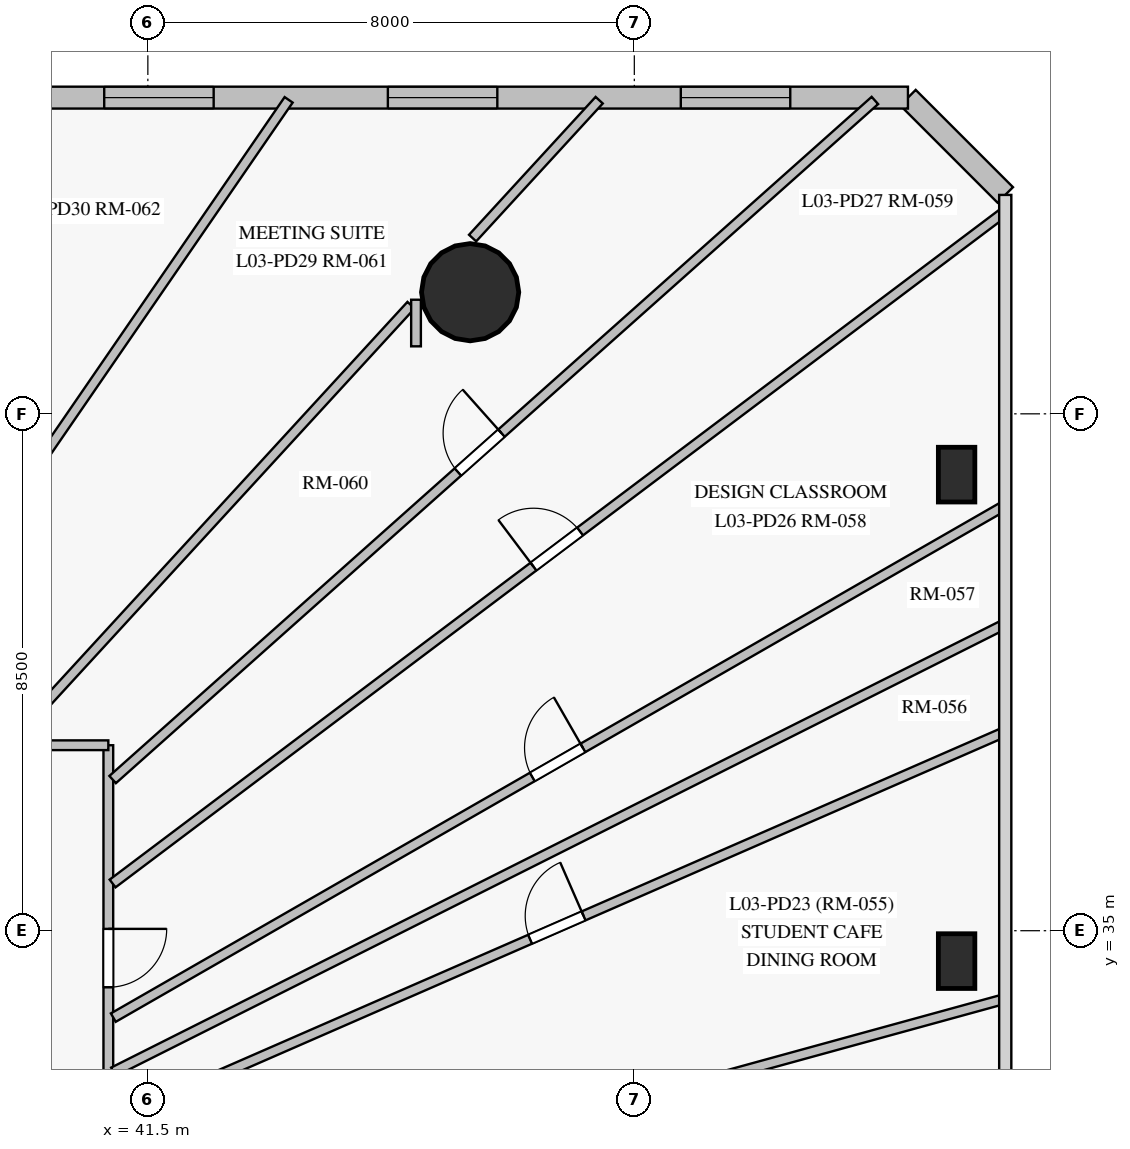
"""IFC4 building model, lengths in metres.
Left out: names, types, materials, properties, quantities, classifications, styles, units other than length and angle.
Written with IfcOpenShell. Run it as: python <this file> out.ifc"""

import sys

from ifc_helpers import new_model, si_unit, direction, frame, frame_2d, origin, origin_with_axes, origin_2d, place, context, subcontext, project, spatial, rectangle, circle, extrude, source, transform, mapped, element, fill, save


model = new_model("IFC4")
c1 = context("Model", 3, precision=1e-05, world=origin(), true_north=direction((0.0, 1.0)))
c2 = subcontext(c1, "Body", "Model", "MODEL_VIEW")
j1 = project(units=[si_unit("LENGTHUNIT", "METRE"), si_unit("PLANEANGLEUNIT", "RADIAN")], contexts=[c1])
p1 = place(None, origin())
s1 = spatial("IfcSite", under=j1, at=p1, CompositionType="ELEMENT")
p2 = place(p1, origin())
s2 = spatial("IfcBuilding", under=s1, at=p2, CompositionType="ELEMENT")
p3 = place(p2, frame((0.0, 0.0, 13.5)))
s3 = spatial("IfcBuildingStorey", under=s2, at=p3, CompositionType="ELEMENT", Elevation=13.5)
m1 = source(origin_with_axes(), c2, "Body", "SweptSolid", [
    extrude(circle(Radius=0.8, at=origin_2d()), origin(), (0.0, 0.0, 1.0), 4.5),
])
p4 = place(p3, frame((46.8, 45.5, 0.0), z_axis=(0.0, 0.0, 1.0), x_axis=(1.0, 0.0, 0.0)))
e1 = element("IfcColumn", 1, at=p4, inside=s3, PredefinedType="COLUMN", context=c2, shape_type="MappedRepresentation", body=[
    mapped(m1, transform((0.0, 0.0, 0.0), scale=1.0)),
])
m2 = source(origin_with_axes(), c2, "Body", "SweptSolid", [
    extrude(rectangle(XDim=0.6, YDim=0.9, at=origin_2d()), origin(), (0.0, 0.0, 1.0), 4.5),
])
for number, where, z_axis, x_axis in (
    (2, (54.8, 34.5, 0.0), (0.0, 0.0, 1.0), (1.0, 0.0, 0.0)),
    (3, (54.8, 42.5, 0.0), (0.0, 0.0, 1.0), (1.0, 0.0, 0.0)),
):
    element("IfcColumn", number, at=place(p3, frame(where, z_axis=z_axis, x_axis=x_axis)), inside=s3, PredefinedType="PILASTER", context=c2, shape_type="MappedRepresentation", body=[
        mapped(m2, transform((0.0, 0.0, 0.0), scale=1.0)),
    ])
p5 = place(p3, frame((55.6, 47.1, 0.0), z_axis=(0.0, 0.0, 1.0), x_axis=(-0.707160727918, 0.707052830339, 0.0)))
e4 = element("IfcWall", 4, at=p5, inside=s3, PredefinedType="SOLIDWALL", context=c2, shape_type="SweptSolid", body=[
    extrude(rectangle(XDim=2.263, YDim=0.36, at=frame_2d((1.131, 0.0))), origin(), (0.0, 0.0, 1.0), 4.225),
])
p6 = place(p3, frame((54.0, 48.7, 0.0), z_axis=(0.0, 0.0, 1.0), x_axis=(-1.0, 0.0, 0.0)))
e5 = element("IfcWall", 5, at=p6, inside=s3, PredefinedType="SOLIDWALL", context=c2, shape_type="SweptSolid", body=[
    extrude(rectangle(XDim=46.8, YDim=0.36, at=frame_2d((23.4, 0.0))), origin(), (0.0, 0.0, 1.0), 4.225),
])
p7 = place(p6, frame((1.936, 0.0, 0.85)))
e6 = element("IfcOpeningElement", 6, at=p7, cuts=e5, PredefinedType="OPENING", context=c2, shape_type="SweptSolid", body=[
    extrude(rectangle(XDim=1.8, YDim=2.2, at=frame_2d((0.9, 1.1))), frame((0.0, 0.19, 0.0), z_axis=(0.0, -1.0, 0.0), x_axis=(1.0, 0.0, 0.0)), (0.0, 0.0, 1.0), 0.38),
])
p8 = place(p6, frame((6.753, 0.0, 0.85)))
e7 = element("IfcOpeningElement", 7, at=p8, cuts=e5, PredefinedType="OPENING", context=c2, shape_type="SweptSolid", body=[
    extrude(rectangle(XDim=1.8, YDim=2.2, at=frame_2d((0.9, 1.1))), frame((0.0, 0.19, 0.0), z_axis=(0.0, -1.0, 0.0), x_axis=(1.0, 0.0, 0.0)), (0.0, 0.0, 1.0), 0.38),
])
p9 = place(p6, frame((11.418, 0.0, 0.85)))
e8 = element("IfcOpeningElement", 8, at=p9, cuts=e5, PredefinedType="OPENING", context=c2, shape_type="SweptSolid", body=[
    extrude(rectangle(XDim=1.8, YDim=2.2, at=frame_2d((0.9, 1.1))), frame((0.0, 0.19, 0.0), z_axis=(0.0, -1.0, 0.0), x_axis=(1.0, 0.0, 0.0)), (0.0, 0.0, 1.0), 0.38),
])
p10 = place(p6, frame((15.637, 0.0, 0.85)))
e9 = element("IfcOpeningElement", 9, at=p10, cuts=e5, PredefinedType="OPENING", context=c2, shape_type="SweptSolid", body=[
    extrude(rectangle(XDim=1.8, YDim=2.2, at=frame_2d((0.9, 1.1))), frame((0.0, 0.19, 0.0), z_axis=(0.0, -1.0, 0.0), x_axis=(1.0, 0.0, 0.0)), (0.0, 0.0, 1.0), 0.38),
])
p11 = place(p6, frame((20.561, 0.0, 0.85)))
e10 = element("IfcOpeningElement", 10, at=p11, cuts=e5, PredefinedType="OPENING", context=c2, shape_type="SweptSolid", body=[
    extrude(rectangle(XDim=1.8, YDim=2.2, at=frame_2d((0.9, 1.1))), frame((0.0, 0.19, 0.0), z_axis=(0.0, -1.0, 0.0), x_axis=(1.0, 0.0, 0.0)), (0.0, 0.0, 1.0), 0.38),
])
p12 = place(p6, frame((25.54, 0.0, 0.85)))
e11 = element("IfcOpeningElement", 11, at=p12, cuts=e5, PredefinedType="OPENING", context=c2, shape_type="SweptSolid", body=[
    extrude(rectangle(XDim=1.8, YDim=2.2, at=frame_2d((0.9, 1.1))), frame((0.0, 0.19, 0.0), z_axis=(0.0, -1.0, 0.0), x_axis=(1.0, 0.0, 0.0)), (0.0, 0.0, 1.0), 0.38),
])
p13 = place(p6, frame((29.8, 0.0, 0.85)))
e12 = element("IfcOpeningElement", 12, at=p13, cuts=e5, PredefinedType="OPENING", context=c2, shape_type="SweptSolid", body=[
    extrude(rectangle(XDim=1.8, YDim=2.2, at=frame_2d((0.9, 1.1))), frame((0.0, 0.19, 0.0), z_axis=(0.0, -1.0, 0.0), x_axis=(1.0, 0.0, 0.0)), (0.0, 0.0, 1.0), 0.38),
])
p14 = place(p6, frame((35.709, 0.0, 0.85)))
e13 = element("IfcOpeningElement", 13, at=p14, cuts=e5, PredefinedType="OPENING", context=c2, shape_type="SweptSolid", body=[
    extrude(rectangle(XDim=1.8, YDim=2.2, at=frame_2d((0.9, 1.1))), frame((0.0, 0.19, 0.0), z_axis=(0.0, -1.0, 0.0), x_axis=(1.0, 0.0, 0.0)), (0.0, 0.0, 1.0), 0.38),
])
p15 = place(p6, frame((42.594, 0.0, 0.85)))
e14 = element("IfcOpeningElement", 14, at=p15, cuts=e5, PredefinedType="OPENING", context=c2, shape_type="SweptSolid", body=[
    extrude(rectangle(XDim=1.8, YDim=2.2, at=frame_2d((0.9, 1.1))), frame((0.0, 0.19, 0.0), z_axis=(0.0, -1.0, 0.0), x_axis=(1.0, 0.0, 0.0)), (0.0, 0.0, 1.0), 0.38),
])
p16 = place(p3, frame((40.85, 38.05, 0.0), z_axis=(0.0, 0.0, 1.0), x_axis=(0.0, -1.0, 0.0)))
e15 = element("IfcWall", 15, at=p16, inside=s3, PredefinedType="PARTITIONING", context=c2, shape_type="SweptSolid", body=[
    extrude(rectangle(XDim=18.508, YDim=0.16, at=frame_2d((9.254, 0.0))), origin(), (0.0, 0.0, 1.0), 3.275),
])
p17 = place(p16, frame((12.94, 0.0, 0.0)))
e16 = element("IfcOpeningElement", 16, at=p17, cuts=e15, PredefinedType="OPENING", context=c2, shape_type="SweptSolid", body=[
    extrude(rectangle(XDim=0.96, YDim=2.15, at=frame_2d((0.48, 1.075))), frame((0.0, 0.09, 0.0), z_axis=(0.0, -1.0, 0.0), x_axis=(1.0, 0.0, 0.0)), (0.0, 0.0, 1.0), 0.18),
])
p18 = place(p16, frame((11.006, 0.0, 0.0)))
e17 = element("IfcOpeningElement", 17, at=p18, cuts=e15, PredefinedType="OPENING", context=c2, shape_type="SweptSolid", body=[
    extrude(rectangle(XDim=0.96, YDim=2.15, at=frame_2d((0.48, 1.075))), frame((0.0, 0.09, 0.0), z_axis=(0.0, -1.0, 0.0), x_axis=(1.0, 0.0, 0.0)), (0.0, 0.0, 1.0), 0.18),
])
p19 = place(p16, frame((8.695, 0.0, 0.0)))
e18 = element("IfcOpeningElement", 18, at=p19, cuts=e15, PredefinedType="OPENING", context=c2, shape_type="SweptSolid", body=[
    extrude(rectangle(XDim=0.96, YDim=2.15, at=frame_2d((0.48, 1.075))), frame((0.0, 0.09, 0.0), z_axis=(0.0, -1.0, 0.0), x_axis=(1.0, 0.0, 0.0)), (0.0, 0.0, 1.0), 0.18),
])
p20 = place(p16, frame((6.434, 0.0, 0.0)))
e19 = element("IfcOpeningElement", 19, at=p20, cuts=e15, PredefinedType="OPENING", context=c2, shape_type="SweptSolid", body=[
    extrude(rectangle(XDim=0.96, YDim=2.15, at=frame_2d((0.48, 1.075))), frame((0.0, 0.09, 0.0), z_axis=(0.0, -1.0, 0.0), x_axis=(1.0, 0.0, 0.0)), (0.0, 0.0, 1.0), 0.18),
])
p21 = place(p16, frame((3.02, 0.0, 0.0)))
e20 = element("IfcOpeningElement", 20, at=p21, cuts=e15, PredefinedType="OPENING", context=c2, shape_type="SweptSolid", body=[
    extrude(rectangle(XDim=0.96, YDim=2.15, at=frame_2d((0.48, 1.075))), frame((0.0, 0.09, 0.0), z_axis=(0.0, -1.0, 0.0), x_axis=(1.0, 0.0, 0.0)), (0.0, 0.0, 1.0), 0.18),
])
p22 = place(p3, frame((40.92, 35.776, 0.0), z_axis=(0.0, 0.0, 1.0), x_axis=(0.798876492125, 0.601495095848, 0.0)))
e21 = element("IfcWall", 21, at=p22, inside=s3, PredefinedType="PARTITIONING", context=c2, shape_type="SweptSolid", body=[
    extrude(rectangle(XDim=18.328, YDim=0.16, at=frame_2d((9.164, 0.0))), origin(), (0.0, 0.0, 1.0), 4.225),
])
p23 = place(p22, frame((8.664, 0.0, 0.0)))
e22 = element("IfcOpeningElement", 22, at=p23, cuts=e21, PredefinedType="OPENING", context=c2, shape_type="SweptSolid", body=[
    extrude(rectangle(XDim=0.96, YDim=2.15, at=frame_2d((0.48, 1.075))), frame((0.0, 0.09, 0.0), z_axis=(0.0, -1.0, 0.0), x_axis=(1.0, 0.0, 0.0)), (0.0, 0.0, 1.0), 0.18),
])
p24 = place(p3, frame((40.932, 33.571, 0.0), z_axis=(0.0, 0.0, 1.0), x_axis=(0.867157652111, 0.498033740207, 0.0)))
e23 = element("IfcWall", 23, at=p24, inside=s3, PredefinedType="PARTITIONING", context=c2, shape_type="SweptSolid", body=[
    extrude(rectangle(XDim=16.876, YDim=0.16, at=frame_2d((8.438, 0.0))), origin(), (0.0, 0.0, 1.0), 4.225),
])
p25 = place(p24, frame((7.946, 0.0, 0.0)))
e24 = element("IfcOpeningElement", 24, at=p25, cuts=e23, PredefinedType="OPENING", context=c2, shape_type="SweptSolid", body=[
    extrude(rectangle(XDim=0.96, YDim=2.15, at=frame_2d((0.48, 1.075))), frame((0.0, 0.09, 0.0), z_axis=(0.0, -1.0, 0.0), x_axis=(1.0, 0.0, 0.0)), (0.0, 0.0, 1.0), 0.18),
])
p26 = place(p3, frame((40.921, 37.485, 0.0), z_axis=(0.0, 0.0, 1.0), x_axis=(0.746657873384, 0.665208253191, 0.0)))
e25 = element("IfcWall", 25, at=p26, inside=s3, PredefinedType="PARTITIONING", context=c2, shape_type="SweptSolid", body=[
    extrude(rectangle(XDim=16.789, YDim=0.16, at=frame_2d((8.394, 0.0))), origin(), (0.0, 0.0, 1.0), 4.225),
])
p27 = place(p26, frame((7.604, 0.0, 0.0)))
e26 = element("IfcOpeningElement", 26, at=p27, cuts=e25, PredefinedType="OPENING", context=c2, shape_type="SweptSolid", body=[
    extrude(rectangle(XDim=0.96, YDim=2.15, at=frame_2d((0.48, 1.075))), frame((0.0, 0.09, 0.0), z_axis=(0.0, -1.0, 0.0), x_axis=(1.0, 0.0, 0.0)), (0.0, 0.0, 1.0), 0.18),
])
p28 = place(p3, frame((40.932, 32.677, 0.0), z_axis=(0.0, 0.0, 1.0), x_axis=(0.893608855562, 0.448846536425, 0.0)))
e27 = element("IfcWall", 27, at=p28, inside=s3, PredefinedType="PARTITIONING", context=c2, shape_type="SweptSolid", body=[
    extrude(rectangle(XDim=16.379, YDim=0.16, at=frame_2d((8.189, 0.0))), origin(), (0.0, 0.0, 1.0), 4.225),
])
p29 = place(p3, frame((40.918, 31.859, 0.0), z_axis=(0.0, 0.0, 1.0), x_axis=(0.91638288518, 0.400302895004, 0.0)))
e28 = element("IfcWall", 28, at=p29, inside=s3, PredefinedType="PARTITIONING", context=c2, shape_type="SweptSolid", body=[
    extrude(rectangle(XDim=15.988, YDim=0.16, at=frame_2d((7.994, 0.0))), origin(), (0.0, 0.0, 1.0), 4.225),
])
p30 = place(p29, frame((7.494, 0.0, 0.0)))
e29 = element("IfcOpeningElement", 29, at=p30, cuts=e28, PredefinedType="OPENING", context=c2, shape_type="SweptSolid", body=[
    extrude(rectangle(XDim=0.96, YDim=2.15, at=frame_2d((0.48, 1.075))), frame((0.0, 0.09, 0.0), z_axis=(0.0, -1.0, 0.0), x_axis=(1.0, 0.0, 0.0)), (0.0, 0.0, 1.0), 0.18),
])
p31 = place(p3, frame((25.4, 38.05, 0.0), z_axis=(0.0, 0.0, 1.0), x_axis=(1.0, 0.0, 0.0)))
e30 = element("IfcWall", 30, at=p31, inside=s3, PredefinedType="PARTITIONING", context=c2, shape_type="SweptSolid", body=[
    extrude(rectangle(XDim=15.45, YDim=0.16, at=frame_2d((7.725, 0.0))), origin(), (0.0, 0.0, 1.0), 4.225),
])
p32 = place(p31, frame((11.752, 0.0, 0.0)))
e31 = element("IfcOpeningElement", 31, at=p32, cuts=e30, PredefinedType="OPENING", context=c2, shape_type="SweptSolid", body=[
    extrude(rectangle(XDim=0.96, YDim=2.15, at=frame_2d((0.48, 1.075))), frame((0.0, 0.09, 0.0), z_axis=(0.0, -1.0, 0.0), x_axis=(1.0, 0.0, 0.0)), (0.0, 0.0, 1.0), 0.18),
])
p33 = place(p31, frame((9.567, 0.0, 0.0)))
e32 = element("IfcOpeningElement", 32, at=p33, cuts=e30, PredefinedType="OPENING", context=c2, shape_type="SweptSolid", body=[
    extrude(rectangle(XDim=0.96, YDim=2.15, at=frame_2d((0.48, 1.075))), frame((0.0, 0.09, 0.0), z_axis=(0.0, -1.0, 0.0), x_axis=(1.0, 0.0, 0.0)), (0.0, 0.0, 1.0), 0.18),
])
p34 = place(p31, frame((7.25, 0.0, 0.0)))
e33 = element("IfcOpeningElement", 33, at=p34, cuts=e30, PredefinedType="OPENING", context=c2, shape_type="SweptSolid", body=[
    extrude(rectangle(XDim=0.96, YDim=2.15, at=frame_2d((0.48, 1.075))), frame((0.0, 0.09, 0.0), z_axis=(0.0, -1.0, 0.0), x_axis=(1.0, 0.0, 0.0)), (0.0, 0.0, 1.0), 0.18),
])
p35 = place(p31, frame((4.933, 0.0, 0.0)))
e34 = element("IfcOpeningElement", 34, at=p35, cuts=e30, PredefinedType="OPENING", context=c2, shape_type="SweptSolid", body=[
    extrude(rectangle(XDim=0.96, YDim=2.15, at=frame_2d((0.48, 1.075))), frame((0.0, 0.09, 0.0), z_axis=(0.0, -1.0, 0.0), x_axis=(1.0, 0.0, 0.0)), (0.0, 0.0, 1.0), 0.18),
])
p36 = place(p3, frame((40.932, 29.852, 0.0), z_axis=(0.0, 0.0, 1.0), x_axis=(0.964293624469, 0.264835431556, 0.0)))
e35 = element("IfcWall", 35, at=p36, inside=s3, PredefinedType="PARTITIONING", context=c2, shape_type="SweptSolid", body=[
    extrude(rectangle(XDim=15.183, YDim=0.16, at=frame_2d((7.592, 0.0))), origin(), (0.0, 0.0, 1.0), 3.725),
])
p37 = place(p3, frame((36.564, 38.12, 0.0), z_axis=(0.0, 0.0, 1.0), x_axis=(0.566648651746, 0.823959529027, 0.0)))
e36 = element("IfcWall", 36, at=p37, inside=s3, PredefinedType="PARTITIONING", context=c2, shape_type="SweptSolid", body=[
    extrude(rectangle(XDim=12.797, YDim=0.16, at=frame_2d((6.398, 0.0))), origin(), (0.0, 0.0, 1.0), 4.225),
])
p38 = place(p3, frame((39.25, 38.121, 0.0), z_axis=(0.0, 0.0, 1.0), x_axis=(0.676243830609, 0.736677868246, 0.0)))
e37 = element("IfcWall", 37, at=p38, inside=s3, PredefinedType="PARTITIONING", context=c2, shape_type="SweptSolid", body=[
    extrude(rectangle(XDim=9.728, YDim=0.16, at=frame_2d((4.864, 0.0))), origin(), (0.0, 0.0, 1.0), 3.275),
])
p39 = place(p3, frame((46.841, 46.39, 0.0), z_axis=(0.0, 0.0, 1.0), x_axis=(0.67620568134, 0.736712886085, 0.0)))
e38 = element("IfcWall", 38, at=p39, inside=s3, PredefinedType="PARTITIONING", context=c2, shape_type="SweptSolid", body=[
    extrude(rectangle(XDim=3.079, YDim=0.16, at=frame_2d((1.539, 0.0))), origin(), (0.0, 0.0, 1.0), 4.225),
])
p40 = place(p3, frame((45.91, 45.376, 0.0), z_axis=(0.0, 0.0, 1.0), x_axis=(0.0, -1.0, 0.0)))
e39 = element("IfcWall", 39, at=p40, inside=s3, PredefinedType="PARTITIONING", context=c2, shape_type="SweptSolid", body=[
    extrude(rectangle(XDim=0.766, YDim=0.16, at=frame_2d((0.383, 0.0))), origin(), (0.0, 0.0, 1.0), 3.275),
])
m3 = source(origin_with_axes(), c2, "Body", "SweptSolid", [
    extrude(rectangle(XDim=1.8, YDim=2.2, at=frame_2d((0.9, 1.1))), frame((0.0, 0.03, 0.0), z_axis=(0.0, -1.0, 0.0), x_axis=(1.0, 0.0, 0.0)), (0.0, 0.0, 1.0), 0.06),
])
p41 = place(p7, origin())
e40 = element("IfcWindow", 40, at=p41, inside=s3, PartitioningType="SINGLE_PANEL", PredefinedType="WINDOW", context=c2, shape_type="MappedRepresentation", body=[
    mapped(m3, transform((0.0, 0.0, 0.0), scale=1.0)),
])
fill(e6, e40)
p42 = place(p8, origin())
e41 = element("IfcWindow", 41, at=p42, inside=s3, PartitioningType="SINGLE_PANEL", PredefinedType="WINDOW", context=c2, shape_type="MappedRepresentation", body=[
    mapped(m3, transform((0.0, 0.0, 0.0), scale=1.0)),
])
fill(e7, e41)
p43 = place(p9, origin())
e42 = element("IfcWindow", 42, at=p43, inside=s3, PartitioningType="SINGLE_PANEL", PredefinedType="WINDOW", context=c2, shape_type="MappedRepresentation", body=[
    mapped(m3, transform((0.0, 0.0, 0.0), scale=1.0)),
])
fill(e8, e42)
m4 = source(origin_with_axes(), c2, "Body", "SweptSolid", [
    extrude(rectangle(XDim=0.96, YDim=2.15, at=frame_2d((0.48, 1.075))), frame((0.0, 0.025, 0.0), z_axis=(0.0, -1.0, 0.0), x_axis=(1.0, 0.0, 0.0)), (0.0, 0.0, 1.0), 0.05),
])
p44 = place(p30, origin())
e43 = element("IfcDoor", 43, at=p44, inside=s3, OperationType="SINGLE_SWING_RIGHT", PredefinedType="DOOR", context=c2, shape_type="MappedRepresentation", body=[
    mapped(m4, transform((0.0, 0.0, 0.0), scale=1.0)),
])
fill(e29, e43)
p45 = place(p21, origin())
e44 = element("IfcDoor", 44, at=p45, inside=s3, OperationType="SINGLE_SWING_LEFT", PredefinedType="DOOR", context=c2, shape_type="MappedRepresentation", body=[
    mapped(m4, transform((0.0, 0.0, 0.0), scale=1.0)),
])
fill(e20, e44)
p46 = place(p25, origin())
e45 = element("IfcDoor", 45, at=p46, inside=s3, OperationType="SINGLE_SWING_RIGHT", PredefinedType="DOOR", context=c2, shape_type="MappedRepresentation", body=[
    mapped(m4, transform((0.0, 0.0, 0.0), scale=1.0)),
])
fill(e24, e45)
p47 = place(p23, origin())
e46 = element("IfcDoor", 46, at=p47, inside=s3, OperationType="SINGLE_SWING_LEFT", PredefinedType="DOOR", context=c2, shape_type="MappedRepresentation", body=[
    mapped(m4, transform((0.0, 0.0, 0.0), scale=1.0)),
])
fill(e22, e46)
p48 = place(p27, origin())
e47 = element("IfcDoor", 47, at=p48, inside=s3, OperationType="SINGLE_SWING_RIGHT", PredefinedType="DOOR", context=c2, shape_type="MappedRepresentation", body=[
    mapped(m4, transform((0.0, 0.0, 0.0), scale=1.0)),
])
fill(e26, e47)
save(model, sys.argv[1])
